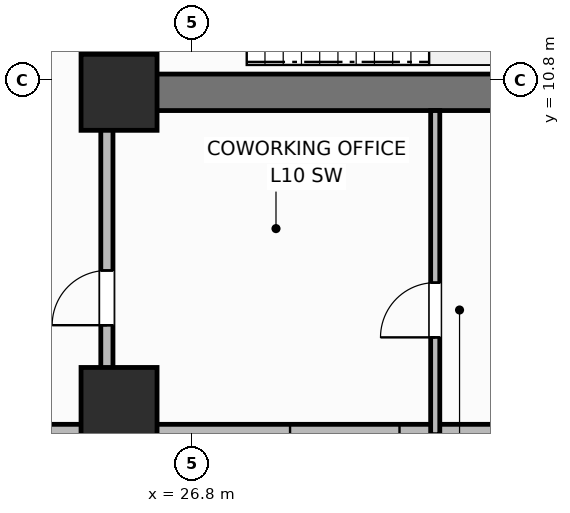
"""IFC4 building model, lengths in metres.
Left out: names, types, materials, properties, quantities, classifications, styles, units other than length and angle.
Written with IfcOpenShell. Run it as: python <this file> out.ifc"""

import sys

from ifc_helpers import new_model, si_unit, direction, frame, frame_2d, origin, origin_2d, place, context, subcontext, project, spatial, rectangle, extrude, element, fill, save


model = new_model("IFC4")
c1 = context("Model", 3, precision=1e-05, world=origin(), true_north=direction((0.0, 1.0)))
c2 = subcontext(c1, "Body", "Model", "MODEL_VIEW")
j1 = project(units=[si_unit("LENGTHUNIT", "METRE"), si_unit("PLANEANGLEUNIT", "RADIAN")], contexts=[c1])
p1 = place(None, origin())
s1 = spatial("IfcSite", under=j1, at=p1, CompositionType="ELEMENT")
p2 = place(p1, origin())
s2 = spatial("IfcBuilding", under=s1, at=p2, CompositionType="ELEMENT")
p3 = place(p2, frame((0.0, 0.0, 43.6)))
s3 = spatial("IfcBuildingStorey", under=s2, at=p3, CompositionType="ELEMENT", Elevation=43.6)
p4 = place(p3, frame((52.8, 10.6, 0.0), z_axis=(0.0, 0.0, 1.0), x_axis=(-1.0, 0.0, 0.0)))
e1 = element("IfcWall", 1, at=p4, inside=s3, PredefinedType="SHEAR", context=c2, shape_type="SweptSolid", body=[
    extrude(rectangle(XDim=27.2, YDim=0.6, at=frame_2d((13.6, 0.0))), origin(), (0.0, 0.0, 1.0), 3.7),
])
p5 = place(p3, frame((25.6, 10.9, 0.0), z_axis=(0.0, 0.0, 1.0), x_axis=(0.0, 1.0, 0.0)))
e2 = element("IfcWall", 2, at=p5, inside=s3, PredefinedType="SHEAR", context=c2, shape_type="SweptSolid", body=[
    extrude(rectangle(XDim=5.6, YDim=0.6, at=frame_2d((2.8, 0.0))), origin(), (0.0, 0.0, 1.0), 3.7),
])
for number, where, z_axis, x_axis in (
    (3, (25.6, 10.6, 0.0), (0.0, 0.0, 1.0), (1.0, 0.0, 0.0)),
    (4, (25.6, 5.45, 0.0), (0.0, 0.0, 1.0), (1.0, 0.0, 0.0)),
):
    element("IfcColumn", number, at=place(p3, frame(where, z_axis=z_axis, x_axis=x_axis)), inside=s3, PredefinedType="COLUMN", context=c2, shape_type="SweptSolid", body=[
        extrude(rectangle(XDim=1.25, YDim=1.25, at=origin_2d()), origin(), (0.0, 0.0, 1.0), 3.7),
    ])
p6 = place(p3, frame((18.6, 4.97, 0.0), z_axis=(0.0, 0.0, 1.0), x_axis=(1.0, 0.0, 0.0)))
e5 = element("IfcWall", 5, at=p6, inside=s3, PredefinedType="SOLIDWALL", context=c2, shape_type="SweptSolid", body=[
    extrude(rectangle(XDim=17.4, YDim=0.34, at=frame_2d((8.7, 0.0))), origin(), (0.0, 0.0, 1.0), 2.7),
])
p7 = place(p6, frame((1.762, 0.0, 0.73)))
e6 = element("IfcOpeningElement", 6, at=p7, cuts=e5, PredefinedType="OPENING", context=c2, shape_type="SweptSolid", body=[
    extrude(rectangle(XDim=1.8, YDim=1.85, at=frame_2d((0.9, 0.925))), frame((0.0, 0.18, 0.0), z_axis=(0.0, -1.0, 0.0), x_axis=(1.0, 0.0, 0.0)), (0.0, 0.0, 1.0), 0.36),
])
p8 = place(p6, frame((9.812, 0.0, 0.73)))
e7 = element("IfcOpeningElement", 7, at=p8, cuts=e5, PredefinedType="OPENING", context=c2, shape_type="SweptSolid", body=[
    extrude(rectangle(XDim=1.8, YDim=1.85, at=frame_2d((0.9, 0.925))), frame((0.0, 0.18, 0.0), z_axis=(0.0, -1.0, 0.0), x_axis=(1.0, 0.0, 0.0)), (0.0, 0.0, 1.0), 0.36),
])
p9 = place(p6, frame((13.488, 0.0, 0.73)))
e8 = element("IfcOpeningElement", 8, at=p9, cuts=e5, PredefinedType="OPENING", context=c2, shape_type="SweptSolid", body=[
    extrude(rectangle(XDim=1.8, YDim=1.85, at=frame_2d((0.9, 0.925))), frame((0.0, 0.18, 0.0), z_axis=(0.0, -1.0, 0.0), x_axis=(1.0, 0.0, 0.0)), (0.0, 0.0, 1.0), 0.36),
])
p10 = place(p3, frame((30.8, 4.97, 0.0), z_axis=(0.0, 0.0, 1.0), x_axis=(0.0, 1.0, 0.0)))
e9 = element("IfcWall", 9, at=p10, inside=s3, PredefinedType="PARTITIONING", context=c2, shape_type="SweptSolid", body=[
    extrude(rectangle(XDim=5.33, YDim=0.15, at=frame_2d((2.665, 0.0))), origin(), (0.0, 0.0, 1.0), 2.53),
])
p11 = place(p10, frame((1.6, 0.0, 0.0)))
e10 = element("IfcOpeningElement", 10, at=p11, cuts=e9, PredefinedType="OPENING", context=c2, shape_type="SweptSolid", body=[
    extrude(rectangle(XDim=0.9, YDim=2.1, at=frame_2d((0.45, 1.05))), frame((0.0, 0.085, 0.0), z_axis=(0.0, -1.0, 0.0), x_axis=(1.0, 0.0, 0.0)), (0.0, 0.0, 1.0), 0.17),
])
p12 = place(p3, frame((25.4, 5.92, 0.0), z_axis=(0.0, 0.0, 1.0), x_axis=(0.0, 1.0, 0.0)))
e11 = element("IfcWall", 11, at=p12, inside=s3, PredefinedType="PARTITIONING", context=c2, shape_type="SweptSolid", body=[
    extrude(rectangle(XDim=4.38, YDim=0.2, at=frame_2d((2.19, 0.0))), origin(), (0.0, 0.0, 1.0), 2.53),
])
p13 = place(p12, frame((0.85, 0.0, 0.0)))
e12 = element("IfcOpeningElement", 12, at=p13, cuts=e11, PredefinedType="OPENING", context=c2, shape_type="SweptSolid", body=[
    extrude(rectangle(XDim=0.9, YDim=2.1, at=frame_2d((0.45, 1.05))), frame((0.0, 0.11, 0.0), z_axis=(0.0, -1.0, 0.0), x_axis=(1.0, 0.0, 0.0)), (0.0, 0.0, 1.0), 0.22),
])
p14 = place(p8, origin())
e13 = element("IfcWindow", 13, at=p14, inside=s3, PartitioningType="SINGLE_PANEL", PredefinedType="WINDOW", context=c2, shape_type="SweptSolid", body=[
    extrude(rectangle(XDim=1.8, YDim=1.85, at=frame_2d((0.9, 0.925))), frame((0.0, 0.03, 0.0), z_axis=(0.0, -1.0, 0.0), x_axis=(1.0, 0.0, 0.0)), (0.0, 0.0, 1.0), 0.06),
])
fill(e7, e13)
p15 = place(p11, origin())
e14 = element("IfcDoor", 14, at=p15, inside=s3, OperationType="SINGLE_SWING_LEFT", PredefinedType="DOOR", context=c2, shape_type="SweptSolid", body=[
    extrude(rectangle(XDim=0.9, YDim=2.1, at=frame_2d((0.45, 1.05))), frame((0.0, 0.025, 0.0), z_axis=(0.0, -1.0, 0.0), x_axis=(1.0, 0.0, 0.0)), (0.0, 0.0, 1.0), 0.05),
])
fill(e10, e14)
p16 = place(p13, origin())
e15 = element("IfcDoor", 15, at=p16, inside=s3, OperationType="SINGLE_SWING_LEFT", PredefinedType="DOOR", context=c2, shape_type="SweptSolid", body=[
    extrude(rectangle(XDim=0.9, YDim=2.1, at=frame_2d((0.45, 1.05))), frame((0.0, 0.025, 0.0), z_axis=(0.0, -1.0, 0.0), x_axis=(1.0, 0.0, 0.0)), (0.0, 0.0, 1.0), 0.05),
])
fill(e12, e15)
save(model, sys.argv[1])
